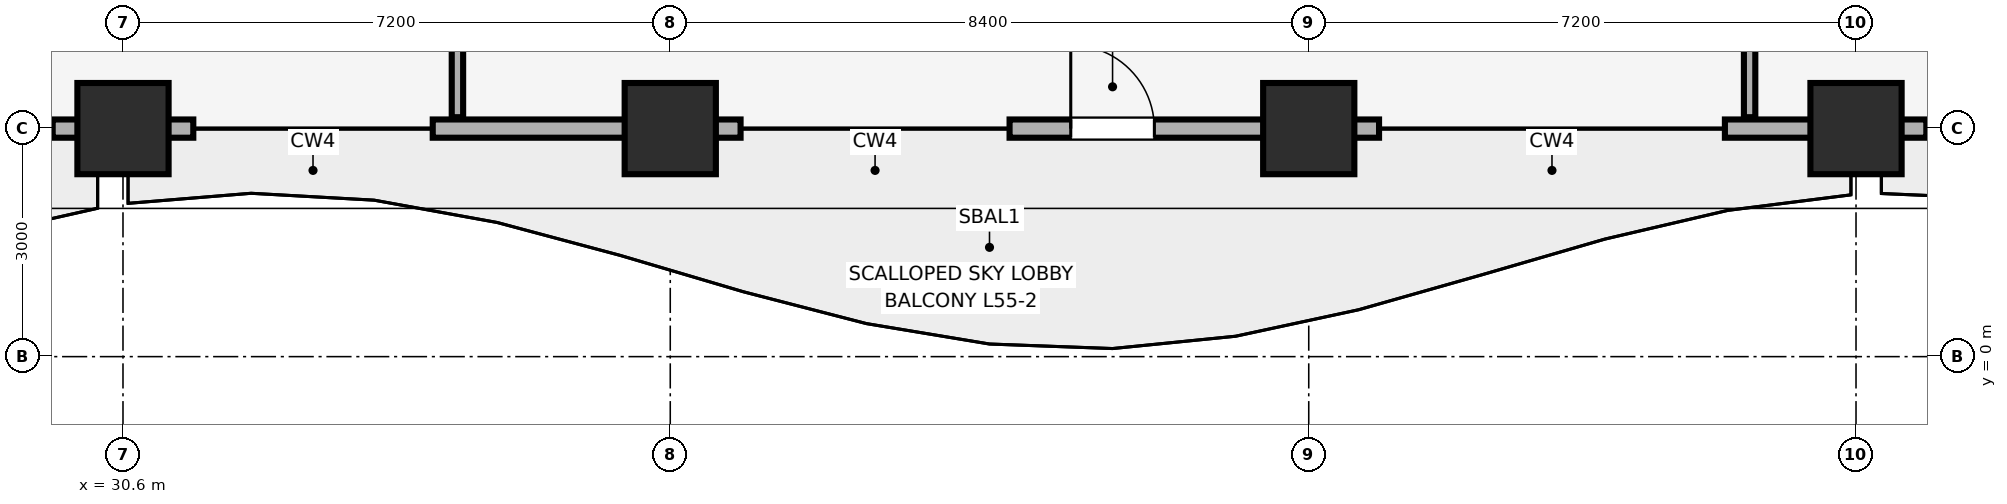
"""IFC4 building model, lengths in metres.
Left out: names, types, materials, properties, quantities, classifications, styles, units other than length and angle.
Written with IfcOpenShell. Run it as: python <this file> out.ifc"""

import sys

from ifc_helpers import new_model, si_unit, direction, frame, frame_2d, origin, origin_2d, place, context, subcontext, project, spatial, rectangle, extrude, element, fill, save


model = new_model("IFC4")
c1 = context("Model", 3, precision=1e-05, world=origin(), true_north=direction((0.0, 1.0)))
c2 = subcontext(c1, "Body", "Model", "MODEL_VIEW")
j1 = project(units=[si_unit("LENGTHUNIT", "METRE"), si_unit("PLANEANGLEUNIT", "RADIAN")], contexts=[c1])
p1 = place(None, origin())
s1 = spatial("IfcSite", under=j1, at=p1, CompositionType="ELEMENT")
p2 = place(p1, origin())
s2 = spatial("IfcBuilding", under=s1, at=p2, CompositionType="ELEMENT")
p3 = place(p2, frame((0.0, 0.0, 224.35)))
s3 = spatial("IfcBuildingStorey", under=s2, at=p3, CompositionType="ELEMENT", Elevation=224.35)
for number, where, z_axis, x_axis in (
    (1, (30.6, 3.0, 0.0), (0.0, 0.0, 1.0), (1.0, 0.0, 0.0)),
    (2, (37.8, 3.0, 0.0), (0.0, 0.0, 1.0), (1.0, 0.0, 0.0)),
    (3, (46.2, 3.0, 0.0), (0.0, 0.0, 1.0), (1.0, 0.0, 0.0)),
    (4, (53.4, 3.0, 0.0), (0.0, 0.0, 1.0), (1.0, 0.0, 0.0)),
):
    element("IfcColumn", number, at=place(p3, frame(where, z_axis=z_axis, x_axis=x_axis)), inside=s3, PredefinedType="COLUMN", context=c2, shape_type="SweptSolid", body=[
        extrude(rectangle(XDim=1.2, YDim=1.2, at=origin_2d()), origin(), (0.0, 0.0, 1.0), 4.56),
    ])
p4 = place(p3, frame((29.675, 3.0, 0.0), z_axis=(0.0, 0.0, 1.0), x_axis=(1.0, 0.0, 0.0)))
e5 = element("IfcWall", 5, at=p4, inside=s3, PredefinedType="SOLIDWALL", context=c2, shape_type="SweptSolid", body=[
    extrude(rectangle(XDim=1.85, YDim=0.24, at=frame_2d((0.925, 0.0))), origin(), (0.0, 0.0, 1.0), 4.52),
])
p5 = place(p3, frame((34.675, 3.0, 0.0), z_axis=(0.0, 0.0, 1.0), x_axis=(1.0, 0.0, 0.0)))
e6 = element("IfcWall", 6, at=p5, inside=s3, PredefinedType="SOLIDWALL", context=c2, shape_type="SweptSolid", body=[
    extrude(rectangle(XDim=4.05, YDim=0.24, at=frame_2d((2.025, 0.0))), origin(), (0.0, 0.0, 1.0), 3.4),
])
p6 = place(p3, frame((42.264, 3.0, 0.0), z_axis=(0.0, 0.0, 1.0), x_axis=(1.0, 0.0, 0.0)))
e7 = element("IfcWall", 7, at=p6, inside=s3, PredefinedType="SOLIDWALL", context=c2, shape_type="SweptSolid", body=[
    extrude(rectangle(XDim=4.861, YDim=0.24, at=frame_2d((2.431, 0.0))), origin(), (0.0, 0.0, 1.0), 3.4),
])
p7 = place(p6, frame((0.805, 0.0, 0.0)))
e8 = element("IfcOpeningElement", 8, at=p7, cuts=e7, PredefinedType="OPENING", context=c2, shape_type="SweptSolid", body=[
    extrude(rectangle(XDim=1.1, YDim=2.15, at=frame_2d((0.55, 1.075))), frame((0.0, 0.13, 0.0), z_axis=(0.0, -1.0, 0.0), x_axis=(1.0, 0.0, 0.0)), (0.0, 0.0, 1.0), 0.26),
])
p8 = place(p3, frame((51.675, 3.0, 0.0), z_axis=(0.0, 0.0, 1.0), x_axis=(1.0, 0.0, 0.0)))
e9 = element("IfcWall", 9, at=p8, inside=s3, PredefinedType="SOLIDWALL", context=c2, shape_type="SweptSolid", body=[
    extrude(rectangle(XDim=2.65, YDim=0.24, at=frame_2d((1.325, 0.0))), origin(), (0.0, 0.0, 1.0), 3.4),
])
for number, where, z_axis, x_axis in (
    (10, (35.0, 3.15, 0.0), (0.0, 0.0, 1.0), (0.0, 1.0, 0.0)),
    (11, (52.0, 3.15, 0.0), (0.0, 0.0, 1.0), (0.0, 1.0, 0.0)),
):
    element("IfcWall", number, at=place(p3, frame(where, z_axis=z_axis, x_axis=x_axis)), inside=s3, PredefinedType="PARTITIONING", context=c2, shape_type="SweptSolid", body=[
        extrude(rectangle(XDim=15.57, YDim=0.15, at=frame_2d((7.785, 0.0))), origin(), (0.0, 0.0, 1.0), 4.52),
    ])
p9 = place(p7, origin())
e12 = element("IfcDoor", 12, at=p9, inside=s3, OperationType="SINGLE_SWING_LEFT", PredefinedType="DOOR", context=c2, shape_type="SweptSolid", body=[
    extrude(rectangle(XDim=1.1, YDim=2.15, at=frame_2d((0.55, 1.075))), frame((0.0, 0.025, 0.0), z_axis=(0.0, -1.0, 0.0), x_axis=(1.0, 0.0, 0.0)), (0.0, 0.0, 1.0), 0.05),
])
fill(e8, e12)
save(model, sys.argv[1])
